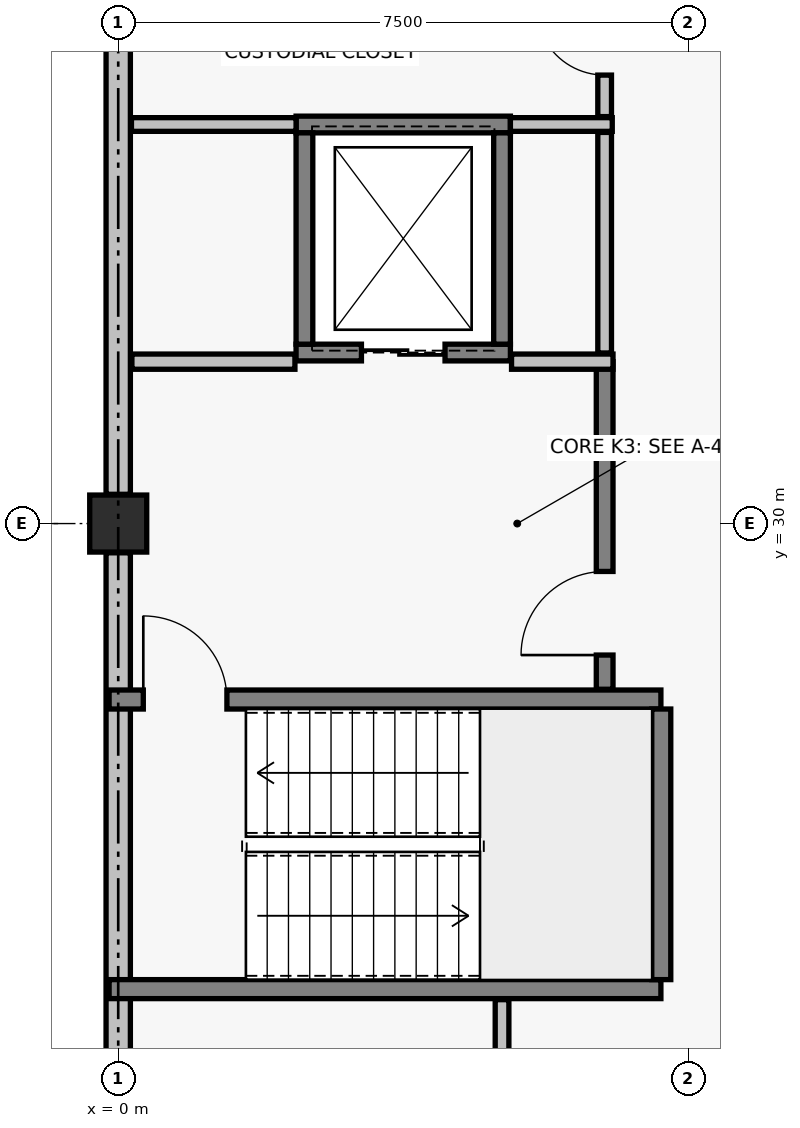
"""IFC4 building model, lengths in metres.
Left out: names, types, materials, properties, quantities, classifications, styles, units other than length and angle.
Written with IfcOpenShell. Run it as: python <this file> out.ifc"""

import sys

from ifc_helpers import new_model, si_unit, direction, frame, frame_2d, origin, origin_2d, place, context, subcontext, project, spatial, rectangle, circle, extrude, element, fill, save


model = new_model("IFC4")
c1 = context("Model", 3, precision=1e-05, world=origin(), true_north=direction((0.0, 1.0)))
c2 = subcontext(c1, "Body", "Model", "MODEL_VIEW")
j1 = project(units=[si_unit("LENGTHUNIT", "METRE"), si_unit("PLANEANGLEUNIT", "RADIAN")], contexts=[c1])
p1 = place(None, origin())
s1 = spatial("IfcSite", under=j1, at=p1, CompositionType="ELEMENT")
p2 = place(p1, origin())
s2 = spatial("IfcBuilding", under=s1, at=p2, CompositionType="ELEMENT")
p3 = place(p2, frame((0.0, 0.0, 4.8)))
s3 = spatial("IfcBuildingStorey", under=s2, at=p3, CompositionType="ELEMENT", Elevation=4.8)
p4 = place(p3, frame((0.0, 30.0, 0.0), z_axis=(0.0, 0.0, 1.0), x_axis=(1.0, 0.0, 0.0)))
e1 = element("IfcColumn", 1, at=p4, inside=s3, PredefinedType="COLUMN", context=c2, shape_type="SweptSolid", body=[
    extrude(circle(Radius=0.375, at=origin_2d()), origin(), (0.0, 0.0, 1.0), 4.2),
])
for number, where, z_axis, x_axis in (
    (2, (0.0, 22.885, 0.0), (0.0, 0.0, 1.0), (0.0, 1.0, 0.0)),
    (3, (0.0, 30.385, 0.0), (0.0, 0.0, 1.0), (0.0, 1.0, 0.0)),
):
    element("IfcWall", number, at=place(p3, frame(where, z_axis=z_axis, x_axis=x_axis)), inside=s3, PredefinedType="SOLIDWALL", context=c2, shape_type="SweptSolid", body=[
        extrude(rectangle(XDim=6.73, YDim=0.32, at=frame_2d((3.365, 0.0))), origin(), (0.0, 0.0, 1.0), 2.89),
    ])
p5 = place(p3, frame((-0.12, 23.875, 0.0), z_axis=(0.0, 0.0, 1.0), x_axis=(1.0, 0.0, 0.0)))
e4 = element("IfcWall", 4, at=p5, inside=s3, PredefinedType="SOLIDWALL", context=c2, shape_type="SweptSolid", body=[
    extrude(rectangle(XDim=7.26, YDim=0.25, at=frame_2d((3.63, 0.0))), origin(), (0.0, 0.0, 1.0), 3.92),
])
p6 = place(p3, frame((-0.12, 27.685, 0.0), z_axis=(0.0, 0.0, 1.0), x_axis=(1.0, 0.0, 0.0)))
e5 = element("IfcWall", 5, at=p6, inside=s3, PredefinedType="SOLIDWALL", context=c2, shape_type="SweptSolid", body=[
    extrude(rectangle(XDim=7.26, YDim=0.25, at=frame_2d((3.63, 0.0))), origin(), (0.0, 0.0, 1.0), 3.92),
])
p7 = place(p6, frame((0.45, 0.0, 0.0)))
e6 = element("IfcOpeningElement", 6, at=p7, cuts=e5, PredefinedType="OPENING", context=c2, shape_type="SweptSolid", body=[
    extrude(rectangle(XDim=1.1, YDim=2.15, at=frame_2d((0.55, 1.075))), frame((0.0, 0.135, 0.0), z_axis=(0.0, -1.0, 0.0), x_axis=(1.0, 0.0, 0.0)), (0.0, 0.0, 1.0), 0.27),
])
p8 = place(p3, frame((7.145, 24.0, 0.0), z_axis=(0.0, 0.0, 1.0), x_axis=(0.0, 1.0, 0.0)))
e7 = element("IfcWall", 7, at=p8, inside=s3, PredefinedType="SOLIDWALL", context=c2, shape_type="SweptSolid", body=[
    extrude(rectangle(XDim=3.56, YDim=0.25, at=frame_2d((1.78, 0.0))), origin(), (0.0, 0.0, 1.0), 3.92),
])
p9 = place(p3, frame((2.34, 32.25, 0.0), z_axis=(0.0, 0.0, 1.0), x_axis=(1.0, 0.0, 0.0)))
e8 = element("IfcWall", 8, at=p9, inside=s3, PredefinedType="SOLIDWALL", context=c2, shape_type="SweptSolid", body=[
    extrude(rectangle(XDim=2.82, YDim=0.22, at=frame_2d((1.41, 0.0))), origin(), (0.0, 0.0, 1.0), 3.92),
])
p10 = place(p9, frame((0.86, 0.0, 0.0)))
e9 = element("IfcOpeningElement", 9, at=p10, cuts=e8, PredefinedType="OPENING", context=c2, shape_type="SweptSolid", body=[
    extrude(rectangle(XDim=1.1, YDim=2.15, at=frame_2d((0.55, 1.075))), frame((0.0, 0.12, 0.0), z_axis=(0.0, -1.0, 0.0), x_axis=(1.0, 0.0, 0.0)), (0.0, 0.0, 1.0), 0.24),
])
p11 = place(p3, frame((2.34, 35.25, 0.0), z_axis=(0.0, 0.0, 1.0), x_axis=(1.0, 0.0, 0.0)))
e10 = element("IfcWall", 10, at=p11, inside=s3, PredefinedType="SOLIDWALL", context=c2, shape_type="SweptSolid", body=[
    extrude(rectangle(XDim=2.82, YDim=0.22, at=frame_2d((1.41, 0.0))), origin(), (0.0, 0.0, 1.0), 3.92),
])
for number, where, z_axis, x_axis in (
    (11, (2.45, 32.36, 0.0), (0.0, 0.0, 1.0), (0.0, 1.0, 0.0)),
    (12, (5.05, 32.36, 0.0), (0.0, 0.0, 1.0), (0.0, 1.0, 0.0)),
):
    element("IfcWall", number, at=place(p3, frame(where, z_axis=z_axis, x_axis=x_axis)), inside=s3, PredefinedType="SOLIDWALL", context=c2, shape_type="SweptSolid", body=[
        extrude(rectangle(XDim=2.78, YDim=0.22, at=frame_2d((1.39, 0.0))), origin(), (0.0, 0.0, 1.0), 3.92),
    ])
p12 = place(p3, frame((6.4, 27.82, 0.0), z_axis=(0.0, 0.0, 1.0), x_axis=(0.0, 1.0, 0.0)))
e13 = element("IfcWall", 13, at=p12, inside=s3, PredefinedType="SOLIDWALL", context=c2, shape_type="SweptSolid", body=[
    extrude(rectangle(XDim=4.31, YDim=0.22, at=frame_2d((2.155, 0.0))), origin(), (0.0, 0.0, 1.0), 3.92),
])
p13 = place(p12, frame((0.45, 0.0, 0.0)))
e14 = element("IfcOpeningElement", 14, at=p13, cuts=e13, PredefinedType="OPENING", context=c2, shape_type="SweptSolid", body=[
    extrude(rectangle(XDim=1.1, YDim=2.15, at=frame_2d((0.55, 1.075))), frame((0.0, 0.12, 0.0), z_axis=(0.0, -1.0, 0.0), x_axis=(1.0, 0.0, 0.0)), (0.0, 0.0, 1.0), 0.24),
])
p14 = place(p3, frame((0.18, 32.13, 0.0), z_axis=(0.0, 0.0, 1.0), x_axis=(1.0, 0.0, 0.0)))
e15 = element("IfcWall", 15, at=p14, inside=s3, PredefinedType="PARTITIONING", context=c2, shape_type="SweptSolid", body=[
    extrude(rectangle(XDim=2.145, YDim=0.2, at=frame_2d((1.073, 0.0))), origin(), (0.0, 0.0, 1.0), 3.15),
])
p15 = place(p3, frame((5.175, 32.13, 0.0), z_axis=(0.0, 0.0, 1.0), x_axis=(1.0, 0.0, 0.0)))
e16 = element("IfcWall", 16, at=p15, inside=s3, PredefinedType="PARTITIONING", context=c2, shape_type="SweptSolid", body=[
    extrude(rectangle(XDim=1.335, YDim=0.2, at=frame_2d((0.667, 0.0))), origin(), (0.0, 0.0, 1.0), 3.6),
])
p16 = place(p3, frame((5.05, 20.274, 0.0), z_axis=(0.0, 0.0, 1.0), x_axis=(0.0, 1.0, 0.0)))
e17 = element("IfcWall", 17, at=p16, inside=s3, PredefinedType="PARTITIONING", context=c2, shape_type="SweptSolid", body=[
    extrude(rectangle(XDim=3.462, YDim=0.18, at=frame_2d((1.731, 0.0))), origin(), (0.0, 0.0, 1.0), 2.89),
])
p17 = place(p3, frame((0.174, 35.25, 0.0), z_axis=(0.0, 0.0, 1.0), x_axis=(1.0, 0.0, 0.0)))
e18 = element("IfcWall", 18, at=p17, inside=s3, PredefinedType="PARTITIONING", context=c2, shape_type="SweptSolid", body=[
    extrude(rectangle(XDim=2.166, YDim=0.18, at=frame_2d((1.083, 0.0))), origin(), (0.0, 0.0, 1.0), 3.14),
])
p18 = place(p3, frame((5.16, 35.25, 0.0), z_axis=(0.0, 0.0, 1.0), x_axis=(1.0, 0.0, 0.0)))
e19 = element("IfcWall", 19, at=p18, inside=s3, PredefinedType="PARTITIONING", context=c2, shape_type="SweptSolid", body=[
    extrude(rectangle(XDim=1.34, YDim=0.18, at=frame_2d((0.67, 0.0))), origin(), (0.0, 0.0, 1.0), 3.27),
])
p19 = place(p3, frame((6.4, 32.244, 0.0), z_axis=(0.0, 0.0, 1.0), x_axis=(0.0, 1.0, 0.0)))
e20 = element("IfcWall", 20, at=p19, inside=s3, PredefinedType="PARTITIONING", context=c2, shape_type="SweptSolid", body=[
    extrude(rectangle(XDim=2.902, YDim=0.18, at=frame_2d((1.451, 0.0))), origin(), (0.0, 0.0, 1.0), 3.27),
])
p20 = place(p3, frame((6.4, 35.354, 0.0), z_axis=(0.0, 0.0, 1.0), x_axis=(0.0, 1.0, 0.0)))
e21 = element("IfcWall", 21, at=p20, inside=s3, PredefinedType="PARTITIONING", context=c2, shape_type="SweptSolid", body=[
    extrude(rectangle(XDim=2.052, YDim=0.18, at=frame_2d((1.026, 0.0))), origin(), (0.0, 0.0, 1.0), 2.89),
])
p21 = place(p20, frame((0.546, 0.0, 0.0)))
e22 = element("IfcOpeningElement", 22, at=p21, cuts=e21, PredefinedType="OPENING", context=c2, shape_type="SweptSolid", body=[
    extrude(rectangle(XDim=0.9, YDim=2.1, at=frame_2d((0.45, 1.05))), frame((0.0, 0.1, 0.0), z_axis=(0.0, -1.0, 0.0), x_axis=(1.0, 0.0, 0.0)), (0.0, 0.0, 1.0), 0.2),
])
p22 = place(p7, origin())
e23 = element("IfcDoor", 23, at=p22, inside=s3, OperationType="SINGLE_SWING_LEFT", PredefinedType="DOOR", context=c2, shape_type="SweptSolid", body=[
    extrude(rectangle(XDim=1.1, YDim=2.15, at=frame_2d((0.55, 1.075))), frame((0.0, 0.025, 0.0), z_axis=(0.0, -1.0, 0.0), x_axis=(1.0, 0.0, 0.0)), (0.0, 0.0, 1.0), 0.05),
])
fill(e6, e23)
p23 = place(p10, origin())
e24 = element("IfcDoor", 24, at=p23, inside=s3, OperationType="SLIDING_TO_LEFT", PredefinedType="DOOR", context=c2, shape_type="SweptSolid", body=[
    extrude(rectangle(XDim=1.1, YDim=2.15, at=frame_2d((0.55, 1.075))), frame((0.0, 0.025, 0.0), z_axis=(0.0, -1.0, 0.0), x_axis=(1.0, 0.0, 0.0)), (0.0, 0.0, 1.0), 0.05),
])
fill(e9, e24)
p24 = place(p13, origin())
e25 = element("IfcDoor", 25, at=p24, inside=s3, OperationType="SINGLE_SWING_LEFT", PredefinedType="DOOR", context=c2, shape_type="SweptSolid", body=[
    extrude(rectangle(XDim=1.1, YDim=2.15, at=frame_2d((0.55, 1.075))), frame((0.0, 0.025, 0.0), z_axis=(0.0, -1.0, 0.0), x_axis=(1.0, 0.0, 0.0)), (0.0, 0.0, 1.0), 0.05),
])
fill(e14, e25)
p25 = place(p21, origin())
e26 = element("IfcDoor", 26, at=p25, inside=s3, OperationType="SINGLE_SWING_RIGHT", PredefinedType="DOOR", context=c2, shape_type="SweptSolid", body=[
    extrude(rectangle(XDim=0.9, YDim=2.1, at=frame_2d((0.45, 1.05))), frame((0.0, 0.025, 0.0), z_axis=(0.0, -1.0, 0.0), x_axis=(1.0, 0.0, 0.0)), (0.0, 0.0, 1.0), 0.05),
])
fill(e22, e26)
save(model, sys.argv[1])
